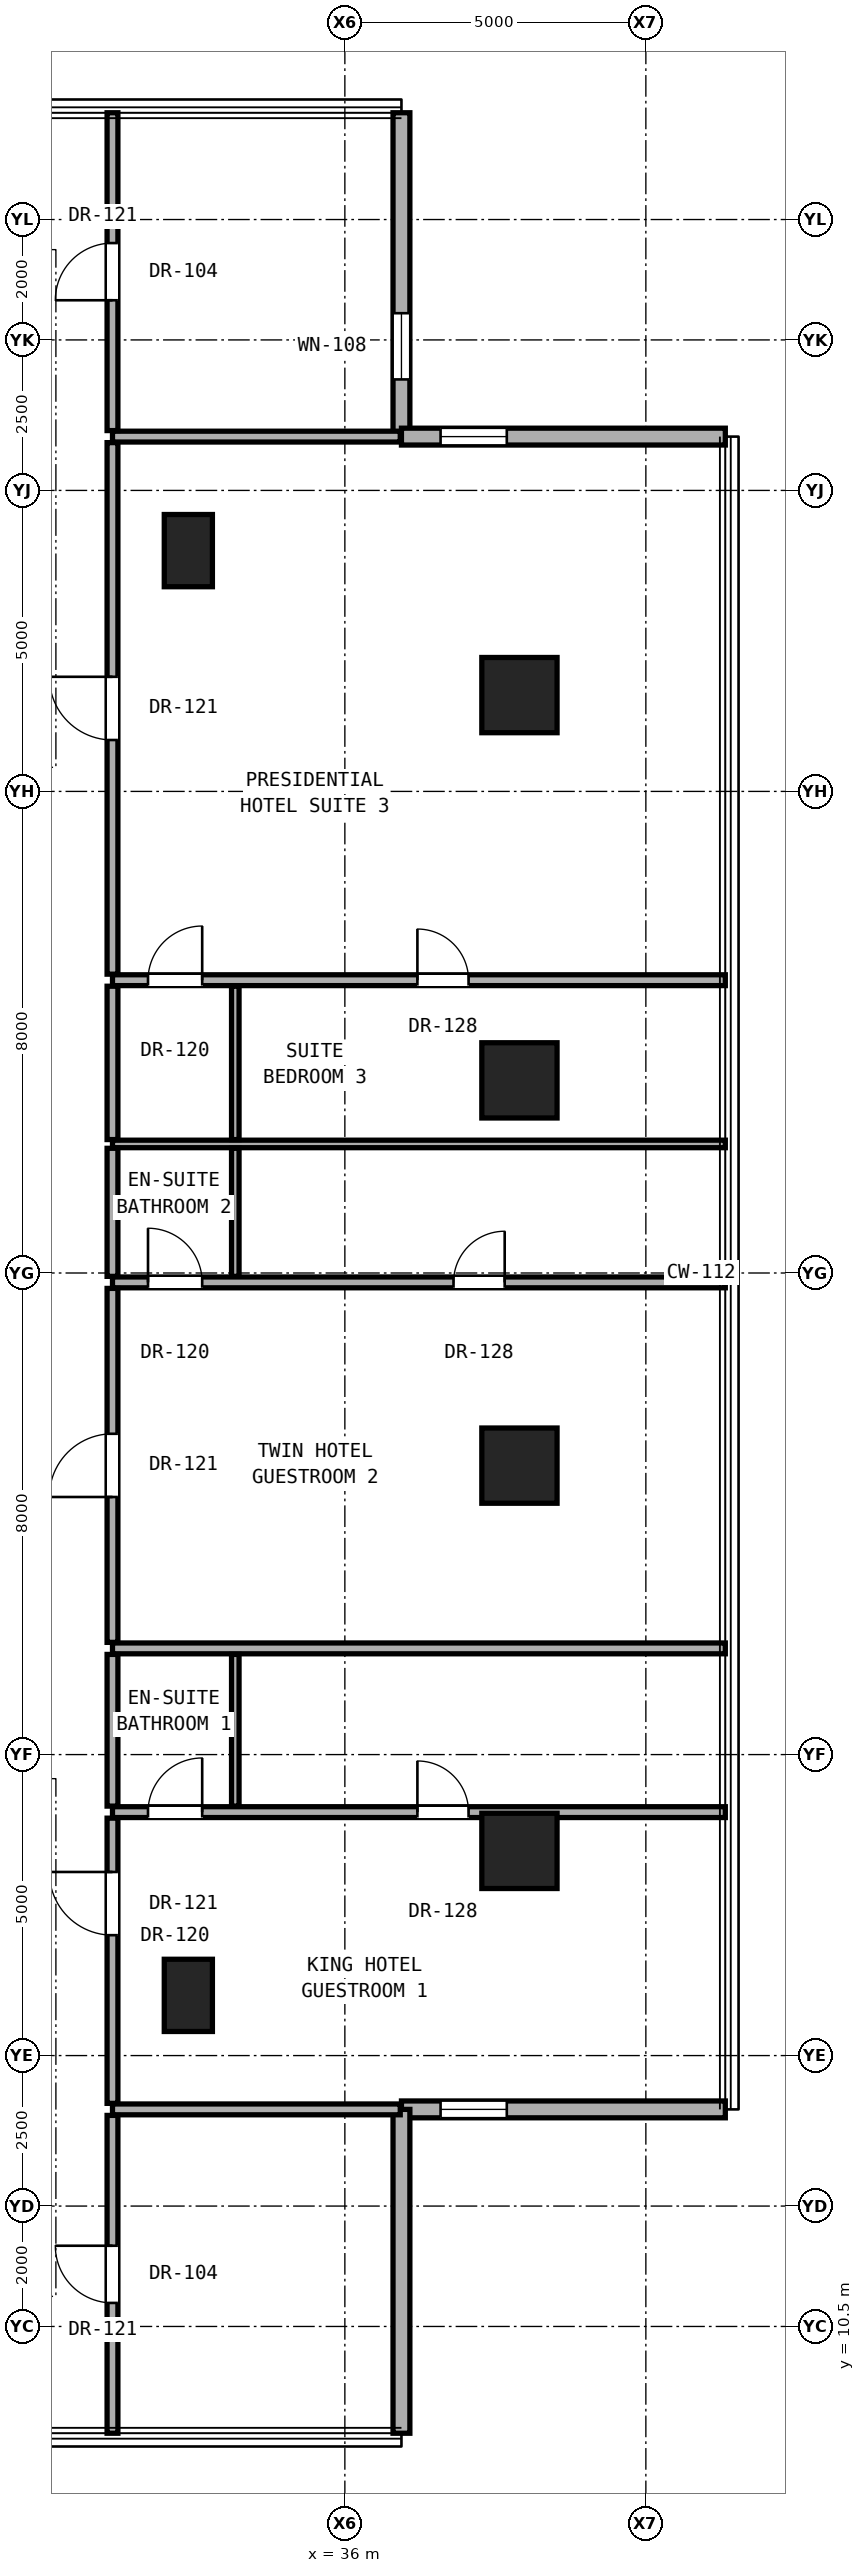
"""IFC4 building model, lengths in metres.
Left out: names, types, materials, properties, quantities, classifications, styles, units other than length and angle.
Written with IfcOpenShell. Run it as: python <this file> out.ifc"""

import sys

from ifc_helpers import new_model, si_unit, direction, frame, frame_2d, origin, origin_2d, place, context, subcontext, project, spatial, rectangle, hollow_rectangle, extrude, element, fill, save


model = new_model("IFC4")
c1 = context("Model", 3, precision=1e-05, world=origin(), true_north=direction((0.0, 1.0)))
c2 = subcontext(c1, "Body", "Model", "MODEL_VIEW")
j1 = project(units=[si_unit("LENGTHUNIT", "METRE"), si_unit("PLANEANGLEUNIT", "RADIAN")], contexts=[c1])
p1 = place(None, origin())
s1 = spatial("IfcSite", under=j1, at=p1, CompositionType="ELEMENT")
p2 = place(p1, origin())
s2 = spatial("IfcBuilding", under=s1, at=p2, CompositionType="ELEMENT")
p3 = place(p2, frame((0.0, 0.0, 32.3)))
s3 = spatial("IfcBuildingStorey", under=s2, at=p3, CompositionType="ELEMENT", Elevation=32.3)
for number, where, z_axis, x_axis in (
    (1, (38.9, 18.4, 0.0), (0.0, 0.0, 1.0), (1.0, 0.0, 0.0)),
    (2, (38.9, 24.8, 0.0), (0.0, 0.0, 1.0), (1.0, 0.0, 0.0)),
    (3, (38.9, 31.2, 0.0), (0.0, 0.0, 1.0), (1.0, 0.0, 0.0)),
    (4, (38.9, 37.6, 0.0), (0.0, 0.0, 1.0), (1.0, 0.0, 0.0)),
):
    element("IfcColumn", number, at=place(p3, frame(where, z_axis=z_axis, x_axis=x_axis)), inside=s3, PredefinedType="COLUMN", context=c2, shape_type="SweptSolid", body=[
        extrude(hollow_rectangle(XDim=1.25, YDim=1.25, WallThickness=0.07, at=origin_2d()), origin(), (0.0, 0.0, 1.0), 3.3),
    ])
for number, where, z_axis, x_axis in (
    (5, (33.4, 16.0, 0.0), (0.0, 0.0, 1.0), (1.0, 0.0, 0.0)),
    (6, (33.4, 40.0, 0.0), (0.0, 0.0, 1.0), (1.0, 0.0, 0.0)),
):
    element("IfcColumn", number, at=place(p3, frame(where, z_axis=z_axis, x_axis=x_axis)), inside=s3, PredefinedType="PILASTER", context=c2, shape_type="SweptSolid", body=[
        extrude(rectangle(XDim=0.8, YDim=1.2, at=origin_2d()), origin(), (0.0, 0.0, 1.0), 3.3),
    ])
p4 = place(p3, frame((36.94, 41.894, 0.0), z_axis=(0.0, 0.0, 1.0), x_axis=(0.0, 1.0, 0.0)))
e7 = element("IfcWall", 7, at=p4, inside=s3, PredefinedType="SOLIDWALL", context=c2, shape_type="SweptSolid", body=[
    extrude(rectangle(XDim=5.38, YDim=0.28, at=frame_2d((2.69, 0.0))), origin(), (0.0, 0.0, 1.0), 3.04),
])
p5 = place(p4, frame((0.95, 0.0, 0.85)))
e8 = element("IfcOpeningElement", 8, at=p5, cuts=e7, PredefinedType="OPENING", context=c2, shape_type="SweptSolid", body=[
    extrude(rectangle(XDim=1.1, YDim=2.0, at=frame_2d((0.55, 1.0))), frame((0.0, 0.15, 0.0), z_axis=(0.0, -1.0, 0.0), x_axis=(1.0, 0.0, 0.0)), (0.0, 0.0, 1.0), 0.3),
])
p6 = place(p3, frame((36.94, 14.106, 0.0), z_axis=(0.0, 0.0, 1.0), x_axis=(1.0, 0.0, 0.0)))
e9 = element("IfcWall", 9, at=p6, inside=s3, PredefinedType="SOLIDWALL", context=c2, shape_type="SweptSolid", body=[
    extrude(rectangle(XDim=5.38, YDim=0.28, at=frame_2d((2.69, 0.0))), origin(), (0.0, 0.0, 1.0), 3.04),
])
p7 = place(p6, frame((0.65, 0.0, 0.85)))
e10 = element("IfcOpeningElement", 10, at=p7, cuts=e9, PredefinedType="OPENING", context=c2, shape_type="SweptSolid", body=[
    extrude(rectangle(XDim=1.1, YDim=2.0, at=frame_2d((0.55, 1.0))), frame((0.0, 0.15, 0.0), z_axis=(0.0, -1.0, 0.0), x_axis=(1.0, 0.0, 0.0)), (0.0, 0.0, 1.0), 0.3),
])
p8 = place(p3, frame((36.94, 8.726, 0.0), z_axis=(0.0, 0.0, 1.0), x_axis=(0.0, 1.0, 0.0)))
e11 = element("IfcWall", 11, at=p8, inside=s3, PredefinedType="SOLIDWALL", context=c2, shape_type="SweptSolid", body=[
    extrude(rectangle(XDim=5.38, YDim=0.28, at=frame_2d((2.69, 0.0))), origin(), (0.0, 0.0, 1.0), 3.04),
])
p9 = place(p3, frame((42.32, 41.894, 0.0), z_axis=(0.0, 0.0, 1.0), x_axis=(-1.0, 0.0, 0.0)))
e12 = element("IfcWall", 12, at=p9, inside=s3, PredefinedType="SOLIDWALL", context=c2, shape_type="SweptSolid", body=[
    extrude(rectangle(XDim=5.38, YDim=0.28, at=frame_2d((2.69, 0.0))), origin(), (0.0, 0.0, 1.0), 3.04),
])
p10 = place(p9, frame((3.63, 0.0, 0.85)))
e13 = element("IfcOpeningElement", 13, at=p10, cuts=e12, PredefinedType="OPENING", context=c2, shape_type="SweptSolid", body=[
    extrude(rectangle(XDim=1.1, YDim=2.0, at=frame_2d((0.55, 1.0))), frame((0.0, 0.15, 0.0), z_axis=(0.0, -1.0, 0.0), x_axis=(1.0, 0.0, 0.0)), (0.0, 0.0, 1.0), 0.3),
])
p11 = place(p3, frame((32.14, 14.106, 0.0), z_axis=(0.0, 0.0, 1.0), x_axis=(1.0, 0.0, 0.0)))
e14 = element("IfcWall", 14, at=p11, inside=s3, PredefinedType="PARTITIONING", context=c2, shape_type="SweptSolid", body=[
    extrude(rectangle(XDim=4.78, YDim=0.18, at=frame_2d((2.39, 0.0))), origin(), (0.0, 0.0, 1.0), 3.06),
])
p12 = place(p3, frame((32.14, 19.044, 0.0), z_axis=(0.0, 0.0, 1.0), x_axis=(1.0, 0.0, 0.0)))
e15 = element("IfcWall", 15, at=p12, inside=s3, PredefinedType="PARTITIONING", context=c2, shape_type="SweptSolid", body=[
    extrude(rectangle(XDim=10.18, YDim=0.18, at=frame_2d((5.09, 0.0))), origin(), (0.0, 0.0, 1.0), 2.125),
])
p13 = place(p12, frame((5.065, 0.0, 0.0)))
e16 = element("IfcOpeningElement", 16, at=p13, cuts=e15, PredefinedType="OPENING", context=c2, shape_type="SweptSolid", body=[
    extrude(rectangle(XDim=0.85, YDim=2.01, at=frame_2d((0.425, 1.005))), frame((0.0, 0.1, 0.0), z_axis=(0.0, -1.0, 0.0), x_axis=(1.0, 0.0, 0.0)), (0.0, 0.0, 1.0), 0.2),
])
p14 = place(p12, frame((0.59, 0.0, 0.0)))
e17 = element("IfcOpeningElement", 17, at=p14, cuts=e15, PredefinedType="OPENING", context=c2, shape_type="SweptSolid", body=[
    extrude(rectangle(XDim=0.9, YDim=2.1, at=frame_2d((0.45, 1.05))), frame((0.0, 0.1, 0.0), z_axis=(0.0, -1.0, 0.0), x_axis=(1.0, 0.0, 0.0)), (0.0, 0.0, 1.0), 0.2),
])
p15 = place(p3, frame((32.14, 21.764, 0.0), z_axis=(0.0, 0.0, 1.0), x_axis=(1.0, 0.0, 0.0)))
e18 = element("IfcWall", 18, at=p15, inside=s3, PredefinedType="PARTITIONING", context=c2, shape_type="SweptSolid", body=[
    extrude(rectangle(XDim=10.18, YDim=0.18, at=frame_2d((5.09, 0.0))), origin(), (0.0, 0.0, 1.0), 2.125),
])
p16 = place(p3, frame((32.14, 27.844, 0.0), z_axis=(0.0, 0.0, 1.0), x_axis=(1.0, 0.0, 0.0)))
e19 = element("IfcWall", 19, at=p16, inside=s3, PredefinedType="PARTITIONING", context=c2, shape_type="SweptSolid", body=[
    extrude(rectangle(XDim=10.18, YDim=0.18, at=frame_2d((5.09, 0.0))), origin(), (0.0, 0.0, 1.0), 2.125),
])
p17 = place(p16, frame((5.665, 0.0, 0.0)))
e20 = element("IfcOpeningElement", 20, at=p17, cuts=e19, PredefinedType="OPENING", context=c2, shape_type="SweptSolid", body=[
    extrude(rectangle(XDim=0.85, YDim=2.01, at=frame_2d((0.425, 1.005))), frame((0.0, 0.1, 0.0), z_axis=(0.0, -1.0, 0.0), x_axis=(1.0, 0.0, 0.0)), (0.0, 0.0, 1.0), 0.2),
])
p18 = place(p16, frame((0.59, 0.0, 0.0)))
e21 = element("IfcOpeningElement", 21, at=p18, cuts=e19, PredefinedType="OPENING", context=c2, shape_type="SweptSolid", body=[
    extrude(rectangle(XDim=0.9, YDim=2.1, at=frame_2d((0.45, 1.05))), frame((0.0, 0.1, 0.0), z_axis=(0.0, -1.0, 0.0), x_axis=(1.0, 0.0, 0.0)), (0.0, 0.0, 1.0), 0.2),
])
p19 = place(p3, frame((32.14, 30.144, 0.0), z_axis=(0.0, 0.0, 1.0), x_axis=(1.0, 0.0, 0.0)))
e22 = element("IfcWall", 22, at=p19, inside=s3, PredefinedType="PARTITIONING", context=c2, shape_type="SweptSolid", body=[
    extrude(rectangle(XDim=10.18, YDim=0.125, at=frame_2d((5.09, 0.0))), origin(), (0.0, 0.0, 1.0), 2.125),
])
p20 = place(p3, frame((32.14, 32.864, 0.0), z_axis=(0.0, 0.0, 1.0), x_axis=(1.0, 0.0, 0.0)))
e23 = element("IfcWall", 23, at=p20, inside=s3, PredefinedType="PARTITIONING", context=c2, shape_type="SweptSolid", body=[
    extrude(rectangle(XDim=10.18, YDim=0.18, at=frame_2d((5.09, 0.0))), origin(), (0.0, 0.0, 1.0), 2.125),
])
p21 = place(p20, frame((5.065, 0.0, 0.0)))
e24 = element("IfcOpeningElement", 24, at=p21, cuts=e23, PredefinedType="OPENING", context=c2, shape_type="SweptSolid", body=[
    extrude(rectangle(XDim=0.85, YDim=2.01, at=frame_2d((0.425, 1.005))), frame((0.0, 0.1, 0.0), z_axis=(0.0, -1.0, 0.0), x_axis=(1.0, 0.0, 0.0)), (0.0, 0.0, 1.0), 0.2),
])
p22 = place(p20, frame((0.59, 0.0, 0.0)))
e25 = element("IfcOpeningElement", 25, at=p22, cuts=e23, PredefinedType="OPENING", context=c2, shape_type="SweptSolid", body=[
    extrude(rectangle(XDim=0.9, YDim=2.1, at=frame_2d((0.45, 1.05))), frame((0.0, 0.1, 0.0), z_axis=(0.0, -1.0, 0.0), x_axis=(1.0, 0.0, 0.0)), (0.0, 0.0, 1.0), 0.2),
])
p23 = place(p3, frame((32.14, 41.894, 0.0), z_axis=(0.0, 0.0, 1.0), x_axis=(1.0, 0.0, 0.0)))
e26 = element("IfcWall", 26, at=p23, inside=s3, PredefinedType="PARTITIONING", context=c2, shape_type="SweptSolid", body=[
    extrude(rectangle(XDim=4.78, YDim=0.18, at=frame_2d((2.39, 0.0))), origin(), (0.0, 0.0, 1.0), 3.06),
])
p24 = place(p3, frame((32.14, 8.726, 0.0), z_axis=(0.0, 0.0, 1.0), x_axis=(0.0, 1.0, 0.0)))
e27 = element("IfcWall", 27, at=p24, inside=s3, PredefinedType="PARTITIONING", context=c2, shape_type="SweptSolid", body=[
    extrude(rectangle(XDim=5.28, YDim=0.18, at=frame_2d((2.64, 0.0))), origin(), (0.0, 0.0, 1.0), 3.06),
])
p25 = place(p24, frame((2.165, 0.0, 0.0)))
e28 = element("IfcOpeningElement", 28, at=p25, cuts=e27, PredefinedType="OPENING", context=c2, shape_type="SweptSolid", body=[
    extrude(rectangle(XDim=0.95, YDim=2.15, at=frame_2d((0.475, 1.075))), frame((0.0, 0.1, 0.0), z_axis=(0.0, -1.0, 0.0), x_axis=(1.0, 0.0, 0.0)), (0.0, 0.0, 1.0), 0.2),
])
p26 = place(p3, frame((32.14, 14.206, 0.0), z_axis=(0.0, 0.0, 1.0), x_axis=(0.0, 1.0, 0.0)))
e29 = element("IfcWall", 29, at=p26, inside=s3, PredefinedType="PARTITIONING", context=c2, shape_type="SweptSolid", body=[
    extrude(rectangle(XDim=4.738, YDim=0.18, at=frame_2d((2.369, 0.0))), origin(), (0.0, 0.0, 1.0), 2.436),
])
p27 = place(p26, frame((2.794, 0.0, 0.0)))
e30 = element("IfcOpeningElement", 30, at=p27, cuts=e29, PredefinedType="OPENING", context=c2, shape_type="SweptSolid", body=[
    extrude(rectangle(XDim=1.05, YDim=2.2, at=frame_2d((0.525, 1.1))), frame((0.0, 0.1, 0.0), z_axis=(0.0, -1.0, 0.0), x_axis=(1.0, 0.0, 0.0)), (0.0, 0.0, 1.0), 0.2),
])
p28 = place(p3, frame((32.14, 19.144, 0.0), z_axis=(0.0, 0.0, 1.0), x_axis=(0.0, 1.0, 0.0)))
e31 = element("IfcWall", 31, at=p28, inside=s3, PredefinedType="PARTITIONING", context=c2, shape_type="SweptSolid", body=[
    extrude(rectangle(XDim=2.52, YDim=0.18, at=frame_2d((1.26, 0.0))), origin(), (0.0, 0.0, 1.0), 3.06),
])
p29 = place(p3, frame((32.14, 21.864, 0.0), z_axis=(0.0, 0.0, 1.0), x_axis=(0.0, 1.0, 0.0)))
e32 = element("IfcWall", 32, at=p29, inside=s3, PredefinedType="PARTITIONING", context=c2, shape_type="SweptSolid", body=[
    extrude(rectangle(XDim=5.88, YDim=0.18, at=frame_2d((2.94, 0.0))), origin(), (0.0, 0.0, 1.0), 2.279),
])
p30 = place(p29, frame((2.415, 0.0, 0.0)))
e33 = element("IfcOpeningElement", 33, at=p30, cuts=e32, PredefinedType="OPENING", context=c2, shape_type="SweptSolid", body=[
    extrude(rectangle(XDim=1.05, YDim=2.2, at=frame_2d((0.525, 1.1))), frame((0.0, 0.1, 0.0), z_axis=(0.0, -1.0, 0.0), x_axis=(1.0, 0.0, 0.0)), (0.0, 0.0, 1.0), 0.2),
])
p31 = place(p3, frame((32.14, 27.944, 0.0), z_axis=(0.0, 0.0, 1.0), x_axis=(0.0, 1.0, 0.0)))
e34 = element("IfcWall", 34, at=p31, inside=s3, PredefinedType="PARTITIONING", context=c2, shape_type="SweptSolid", body=[
    extrude(rectangle(XDim=2.127, YDim=0.18, at=frame_2d((1.064, 0.0))), origin(), (0.0, 0.0, 1.0), 3.06),
])
p32 = place(p3, frame((32.14, 30.217, 0.0), z_axis=(0.0, 0.0, 1.0), x_axis=(0.0, 1.0, 0.0)))
e35 = element("IfcWall", 35, at=p32, inside=s3, PredefinedType="PARTITIONING", context=c2, shape_type="SweptSolid", body=[
    extrude(rectangle(XDim=2.547, YDim=0.18, at=frame_2d((1.274, 0.0))), origin(), (0.0, 0.0, 1.0), 2.279),
])
p33 = place(p3, frame((32.14, 32.964, 0.0), z_axis=(0.0, 0.0, 1.0), x_axis=(0.0, 1.0, 0.0)))
e36 = element("IfcWall", 36, at=p33, inside=s3, PredefinedType="PARTITIONING", context=c2, shape_type="SweptSolid", body=[
    extrude(rectangle(XDim=8.83, YDim=0.18, at=frame_2d((4.415, 0.0))), origin(), (0.0, 0.0, 1.0), 2.436),
])
p34 = place(p33, frame((3.89, 0.0, 0.0)))
e37 = element("IfcOpeningElement", 37, at=p34, cuts=e36, PredefinedType="OPENING", context=c2, shape_type="SweptSolid", body=[
    extrude(rectangle(XDim=1.05, YDim=2.2, at=frame_2d((0.525, 1.1))), frame((0.0, 0.1, 0.0), z_axis=(0.0, -1.0, 0.0), x_axis=(1.0, 0.0, 0.0)), (0.0, 0.0, 1.0), 0.2),
])
p35 = place(p3, frame((32.14, 41.994, 0.0), z_axis=(0.0, 0.0, 1.0), x_axis=(0.0, 1.0, 0.0)))
e38 = element("IfcWall", 38, at=p35, inside=s3, PredefinedType="PARTITIONING", context=c2, shape_type="SweptSolid", body=[
    extrude(rectangle(XDim=5.28, YDim=0.18, at=frame_2d((2.64, 0.0))), origin(), (0.0, 0.0, 1.0), 3.06),
])
p36 = place(p35, frame((2.165, 0.0, 0.0)))
e39 = element("IfcOpeningElement", 39, at=p36, cuts=e38, PredefinedType="OPENING", context=c2, shape_type="SweptSolid", body=[
    extrude(rectangle(XDim=0.95, YDim=2.15, at=frame_2d((0.475, 1.075))), frame((0.0, 0.1, 0.0), z_axis=(0.0, -1.0, 0.0), x_axis=(1.0, 0.0, 0.0)), (0.0, 0.0, 1.0), 0.2),
])
p37 = place(p3, frame((34.18, 19.144, 0.0), z_axis=(0.0, 0.0, 1.0), x_axis=(0.0, 1.0, 0.0)))
e40 = element("IfcWall", 40, at=p37, inside=s3, PredefinedType="PARTITIONING", context=c2, shape_type="SweptSolid", body=[
    extrude(rectangle(XDim=2.52, YDim=0.125, at=frame_2d((1.26, 0.0))), origin(), (0.0, 0.0, 1.0), 3.06),
])
p38 = place(p3, frame((34.18, 27.944, 0.0), z_axis=(0.0, 0.0, 1.0), x_axis=(0.0, 1.0, 0.0)))
e41 = element("IfcWall", 41, at=p38, inside=s3, PredefinedType="PARTITIONING", context=c2, shape_type="SweptSolid", body=[
    extrude(rectangle(XDim=2.127, YDim=0.125, at=frame_2d((1.064, 0.0))), origin(), (0.0, 0.0, 1.0), 3.06),
])
p39 = place(p3, frame((34.18, 30.217, 0.0), z_axis=(0.0, 0.0, 1.0), x_axis=(0.0, 1.0, 0.0)))
e42 = element("IfcWall", 42, at=p39, inside=s3, PredefinedType="PARTITIONING", context=c2, shape_type="SweptSolid", body=[
    extrude(rectangle(XDim=2.547, YDim=0.125, at=frame_2d((1.274, 0.0))), origin(), (0.0, 0.0, 1.0), 2.279),
])
p40 = place(p5, origin())
e43 = element("IfcWindow", 43, at=p40, inside=s3, PartitioningType="SINGLE_PANEL", PredefinedType="WINDOW", context=c2, shape_type="SweptSolid", body=[
    extrude(rectangle(XDim=1.1, YDim=2.0, at=frame_2d((0.55, 1.0))), frame((0.0, 0.03, 0.0), z_axis=(0.0, -1.0, 0.0), x_axis=(1.0, 0.0, 0.0)), (0.0, 0.0, 1.0), 0.06),
])
fill(e8, e43)
p41 = place(p7, origin())
e44 = element("IfcWindow", 44, at=p41, inside=s3, PartitioningType="SINGLE_PANEL", PredefinedType="WINDOW", context=c2, shape_type="SweptSolid", body=[
    extrude(rectangle(XDim=1.1, YDim=2.0, at=frame_2d((0.55, 1.0))), frame((0.0, 0.03, 0.0), z_axis=(0.0, -1.0, 0.0), x_axis=(1.0, 0.0, 0.0)), (0.0, 0.0, 1.0), 0.06),
])
fill(e10, e44)
p42 = place(p10, origin())
e45 = element("IfcWindow", 45, at=p42, inside=s3, PartitioningType="SINGLE_PANEL", PredefinedType="WINDOW", context=c2, shape_type="SweptSolid", body=[
    extrude(rectangle(XDim=1.1, YDim=2.0, at=frame_2d((0.55, 1.0))), frame((0.0, 0.03, 0.0), z_axis=(0.0, -1.0, 0.0), x_axis=(1.0, 0.0, 0.0)), (0.0, 0.0, 1.0), 0.06),
])
fill(e13, e45)
p43 = place(p27, origin())
e46 = element("IfcDoor", 46, at=p43, inside=s3, OperationType="SINGLE_SWING_RIGHT", PredefinedType="DOOR", context=c2, shape_type="SweptSolid", body=[
    extrude(rectangle(XDim=1.05, YDim=2.2, at=frame_2d((0.525, 1.1))), frame((0.0, 0.025, 0.0), z_axis=(0.0, -1.0, 0.0), x_axis=(1.0, 0.0, 0.0)), (0.0, 0.0, 1.0), 0.05),
])
fill(e30, e46)
p44 = place(p13, origin())
e47 = element("IfcDoor", 47, at=p44, inside=s3, OperationType="SINGLE_SWING_LEFT", PredefinedType="DOOR", context=c2, shape_type="SweptSolid", body=[
    extrude(rectangle(XDim=0.85, YDim=2.01, at=frame_2d((0.425, 1.005))), frame((0.0, 0.025, 0.0), z_axis=(0.0, -1.0, 0.0), x_axis=(1.0, 0.0, 0.0)), (0.0, 0.0, 1.0), 0.05),
])
fill(e16, e47)
p45 = place(p14, origin())
e48 = element("IfcDoor", 48, at=p45, inside=s3, OperationType="SINGLE_SWING_RIGHT", PredefinedType="DOOR", context=c2, shape_type="SweptSolid", body=[
    extrude(rectangle(XDim=0.9, YDim=2.1, at=frame_2d((0.45, 1.05))), frame((0.0, 0.025, 0.0), z_axis=(0.0, -1.0, 0.0), x_axis=(1.0, 0.0, 0.0)), (0.0, 0.0, 1.0), 0.05),
])
fill(e17, e48)
p46 = place(p30, origin())
e49 = element("IfcDoor", 49, at=p46, inside=s3, OperationType="SINGLE_SWING_LEFT", PredefinedType="DOOR", context=c2, shape_type="SweptSolid", body=[
    extrude(rectangle(XDim=1.05, YDim=2.2, at=frame_2d((0.525, 1.1))), frame((0.0, 0.025, 0.0), z_axis=(0.0, -1.0, 0.0), x_axis=(1.0, 0.0, 0.0)), (0.0, 0.0, 1.0), 0.05),
])
fill(e33, e49)
p47 = place(p17, origin())
e50 = element("IfcDoor", 50, at=p47, inside=s3, OperationType="SINGLE_SWING_RIGHT", PredefinedType="DOOR", context=c2, shape_type="SweptSolid", body=[
    extrude(rectangle(XDim=0.85, YDim=2.01, at=frame_2d((0.425, 1.005))), frame((0.0, 0.025, 0.0), z_axis=(0.0, -1.0, 0.0), x_axis=(1.0, 0.0, 0.0)), (0.0, 0.0, 1.0), 0.05),
])
fill(e20, e50)
p48 = place(p18, origin())
e51 = element("IfcDoor", 51, at=p48, inside=s3, OperationType="SINGLE_SWING_LEFT", PredefinedType="DOOR", context=c2, shape_type="SweptSolid", body=[
    extrude(rectangle(XDim=0.9, YDim=2.1, at=frame_2d((0.45, 1.05))), frame((0.0, 0.025, 0.0), z_axis=(0.0, -1.0, 0.0), x_axis=(1.0, 0.0, 0.0)), (0.0, 0.0, 1.0), 0.05),
])
fill(e21, e51)
p49 = place(p34, origin())
e52 = element("IfcDoor", 52, at=p49, inside=s3, OperationType="SINGLE_SWING_RIGHT", PredefinedType="DOOR", context=c2, shape_type="SweptSolid", body=[
    extrude(rectangle(XDim=1.05, YDim=2.2, at=frame_2d((0.525, 1.1))), frame((0.0, 0.025, 0.0), z_axis=(0.0, -1.0, 0.0), x_axis=(1.0, 0.0, 0.0)), (0.0, 0.0, 1.0), 0.05),
])
fill(e37, e52)
p50 = place(p21, origin())
e53 = element("IfcDoor", 53, at=p50, inside=s3, OperationType="SINGLE_SWING_LEFT", PredefinedType="DOOR", context=c2, shape_type="SweptSolid", body=[
    extrude(rectangle(XDim=0.85, YDim=2.01, at=frame_2d((0.425, 1.005))), frame((0.0, 0.025, 0.0), z_axis=(0.0, -1.0, 0.0), x_axis=(1.0, 0.0, 0.0)), (0.0, 0.0, 1.0), 0.05),
])
fill(e24, e53)
p51 = place(p22, origin())
e54 = element("IfcDoor", 54, at=p51, inside=s3, OperationType="SINGLE_SWING_RIGHT", PredefinedType="DOOR", context=c2, shape_type="SweptSolid", body=[
    extrude(rectangle(XDim=0.9, YDim=2.1, at=frame_2d((0.45, 1.05))), frame((0.0, 0.025, 0.0), z_axis=(0.0, -1.0, 0.0), x_axis=(1.0, 0.0, 0.0)), (0.0, 0.0, 1.0), 0.05),
])
fill(e25, e54)
p52 = place(p25, origin())
e55 = element("IfcDoor", 55, at=p52, inside=s3, OperationType="SINGLE_SWING_RIGHT", PredefinedType="DOOR", context=c2, shape_type="SweptSolid", body=[
    extrude(rectangle(XDim=0.95, YDim=2.15, at=frame_2d((0.475, 1.075))), frame((0.0, 0.025, 0.0), z_axis=(0.0, -1.0, 0.0), x_axis=(1.0, 0.0, 0.0)), (0.0, 0.0, 1.0), 0.05),
])
fill(e28, e55)
p53 = place(p36, origin())
e56 = element("IfcDoor", 56, at=p53, inside=s3, OperationType="SINGLE_SWING_LEFT", PredefinedType="DOOR", context=c2, shape_type="SweptSolid", body=[
    extrude(rectangle(XDim=0.95, YDim=2.15, at=frame_2d((0.475, 1.075))), frame((0.0, 0.025, 0.0), z_axis=(0.0, -1.0, 0.0), x_axis=(1.0, 0.0, 0.0)), (0.0, 0.0, 1.0), 0.05),
])
fill(e39, e56)
save(model, sys.argv[1])
